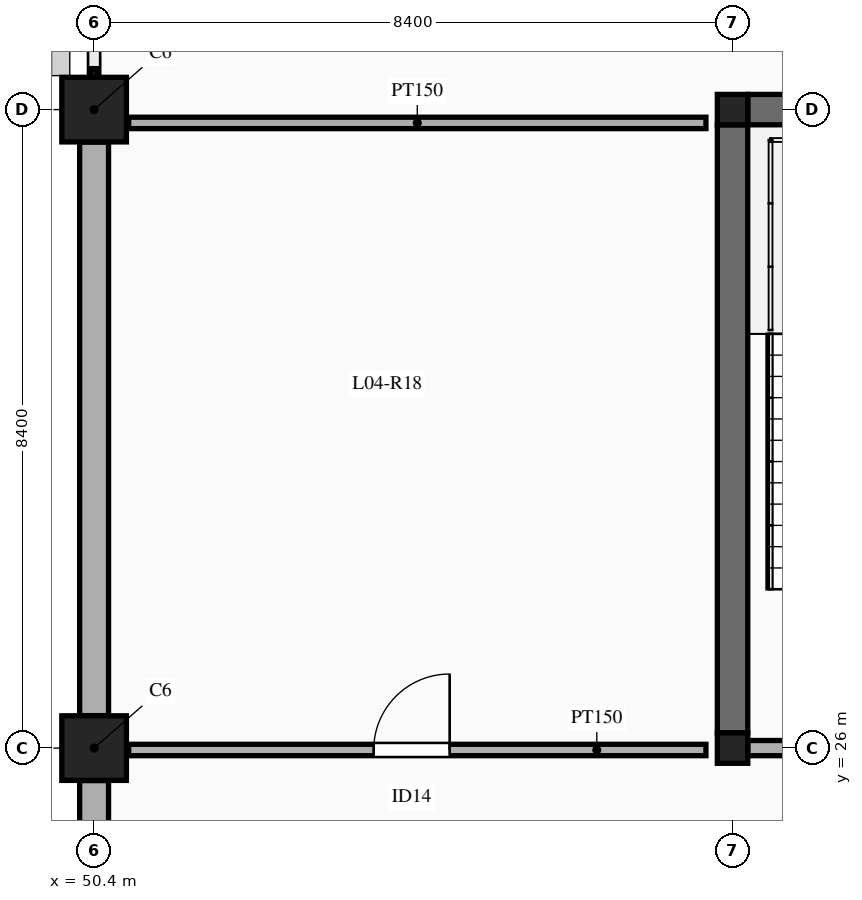
"""IFC4 building model, lengths in metres.
Left out: names, types, materials, properties, quantities, classifications, styles, units other than length and angle.
Written with IfcOpenShell. Run it as: python <this file> out.ifc"""

import sys

from ifc_helpers import new_model, si_unit, direction, frame, frame_2d, origin, origin_2d, place, context, subcontext, project, spatial, rectangle, extrude, element, fill, save


model = new_model("IFC4")
c1 = context("Model", 3, precision=1e-05, world=origin(), true_north=direction((0.0, 1.0)))
c2 = subcontext(c1, "Body", "Model", "MODEL_VIEW")
j1 = project(units=[si_unit("LENGTHUNIT", "METRE"), si_unit("PLANEANGLEUNIT", "RADIAN")], contexts=[c1])
p1 = place(None, origin())
s1 = spatial("IfcSite", under=j1, at=p1, CompositionType="ELEMENT")
p2 = place(p1, origin())
s2 = spatial("IfcBuilding", under=s1, at=p2, CompositionType="ELEMENT")
p3 = place(p2, frame((0.0, 0.0, 19.5)))
s3 = spatial("IfcBuildingStorey", under=s2, at=p3, CompositionType="ELEMENT", Elevation=19.5)
for number, where, z_axis, x_axis in (
    (1, (50.4, 26.0, 0.0), (0.0, 0.0, 1.0), (1.0, 0.0, 0.0)),
    (2, (50.4, 34.4, 0.0), (0.0, 0.0, 1.0), (1.0, 0.0, 0.0)),
):
    element("IfcColumn", number, at=place(p3, frame(where, z_axis=z_axis, x_axis=x_axis)), inside=s3, PredefinedType="COLUMN", context=c2, shape_type="SweptSolid", body=[
        extrude(rectangle(XDim=0.85, YDim=0.85, at=origin_2d()), origin(), (0.0, 0.0, 1.0), 4.5),
    ])
for number, where, z_axis, x_axis in (
    (3, (58.8, 26.0, 0.0), (0.0, 0.0, 1.0), (1.0, 0.0, 0.0)),
    (4, (58.8, 34.4, 0.0), (0.0, 0.0, 1.0), (1.0, 0.0, 0.0)),
):
    element("IfcColumn", number, at=place(p3, frame(where, z_axis=z_axis, x_axis=x_axis)), inside=s3, PredefinedType="COLUMN", context=c2, shape_type="SweptSolid", body=[
        extrude(rectangle(XDim=0.4, YDim=0.4, at=origin_2d()), origin(), (0.0, 0.0, 1.0), 4.5),
    ])
for number, where, z_axis, x_axis in (
    (5, (58.8, 26.2, 0.0), (0.0, 0.0, 1.0), (0.0, 1.0, 0.0)),
    (6, (59.0, 34.4, 0.0), (0.0, 0.0, 1.0), (1.0, 0.0, 0.0)),
):
    element("IfcWall", number, at=place(p3, frame(where, z_axis=z_axis, x_axis=x_axis)), inside=s3, PredefinedType="SHEAR", context=c2, shape_type="SweptSolid", body=[
        extrude(rectangle(XDim=8.0, YDim=0.4, at=frame_2d((4.0, 0.0))), origin(), (0.0, 0.0, 1.0), 4.5),
    ])
for number, where, z_axis, x_axis in (
    (7, (50.4, 18.027, 0.0), (0.0, 0.0, 1.0), (0.0, 1.0, 0.0)),
    (8, (50.4, 26.427, 0.0), (0.0, 0.0, 1.0), (0.0, 1.0, 0.0)),
):
    element("IfcWall", number, at=place(p3, frame(where, z_axis=z_axis, x_axis=x_axis)), inside=s3, PredefinedType="SOLIDWALL", context=c2, shape_type="SweptSolid", body=[
        extrude(rectangle(XDim=7.546, YDim=0.38, at=frame_2d((3.773, 0.0))), origin(), (0.0, 0.0, 1.0), 3.55),
    ])
p4 = place(p3, frame((59.0, 26.0, 0.0), z_axis=(0.0, 0.0, 1.0), x_axis=(1.0, 0.0, 0.0)))
e9 = element("IfcWall", 9, at=p4, inside=s3, PredefinedType="SOLIDWALL", context=c2, shape_type="SweptSolid", body=[
    extrude(rectangle(XDim=8.0, YDim=0.2, at=frame_2d((4.0, 0.0))), origin(), (0.0, 0.0, 1.0), 3.53),
])
p5 = place(p4, frame((1.55, 0.0, 0.0)))
e10 = element("IfcOpeningElement", 10, at=p5, cuts=e9, PredefinedType="OPENING", context=c2, shape_type="SweptSolid", body=[
    extrude(rectangle(XDim=1.15, YDim=2.15, at=frame_2d((0.575, 1.075))), frame((0.0, 0.11, 0.0), z_axis=(0.0, -1.0, 0.0), x_axis=(1.0, 0.0, 0.0)), (0.0, 0.0, 1.0), 0.22),
])
p6 = place(p4, frame((5.35, 0.0, 0.0)))
e11 = element("IfcOpeningElement", 11, at=p6, cuts=e9, PredefinedType="OPENING", context=c2, shape_type="SweptSolid", body=[
    extrude(rectangle(XDim=1.22, YDim=2.15, at=frame_2d((0.61, 1.075))), frame((0.0, 0.11, 0.0), z_axis=(0.0, -1.0, 0.0), x_axis=(1.0, 0.0, 0.0)), (0.0, 0.0, 1.0), 0.22),
])
p7 = place(p3, frame((50.855, 25.975, 0.0), z_axis=(0.0, 0.0, 1.0), x_axis=(1.0, 0.0, 0.0)))
e12 = element("IfcWall", 12, at=p7, inside=s3, PredefinedType="PARTITIONING", context=c2, shape_type="SweptSolid", body=[
    extrude(rectangle(XDim=7.595, YDim=0.15, at=frame_2d((3.797, 0.0))), origin(), (0.0, 0.0, 1.0), 3.45),
])
p8 = place(p7, frame((3.223, 0.0, 0.0)))
e13 = element("IfcOpeningElement", 13, at=p8, cuts=e12, PredefinedType="OPENING", context=c2, shape_type="SweptSolid", body=[
    extrude(rectangle(XDim=1.0, YDim=2.15, at=frame_2d((0.5, 1.075))), frame((0.0, 0.085, 0.0), z_axis=(0.0, -1.0, 0.0), x_axis=(1.0, 0.0, 0.0)), (0.0, 0.0, 1.0), 0.17),
])
p9 = place(p3, frame((50.855, 34.225, 0.0), z_axis=(0.0, 0.0, 1.0), x_axis=(1.0, 0.0, 0.0)))
e14 = element("IfcWall", 14, at=p9, inside=s3, PredefinedType="PARTITIONING", context=c2, shape_type="SweptSolid", body=[
    extrude(rectangle(XDim=7.595, YDim=0.15, at=frame_2d((3.797, 0.0))), origin(), (0.0, 0.0, 1.0), 3.45),
])
p10 = place(p8, origin())
e15 = element("IfcDoor", 15, at=p10, inside=s3, OperationType="SINGLE_SWING_RIGHT", PredefinedType="DOOR", context=c2, shape_type="SweptSolid", body=[
    extrude(rectangle(XDim=1.0, YDim=2.15, at=frame_2d((0.5, 1.075))), frame((0.0, 0.025, 0.0), z_axis=(0.0, -1.0, 0.0), x_axis=(1.0, 0.0, 0.0)), (0.0, 0.0, 1.0), 0.05),
])
fill(e13, e15)
save(model, sys.argv[1])
